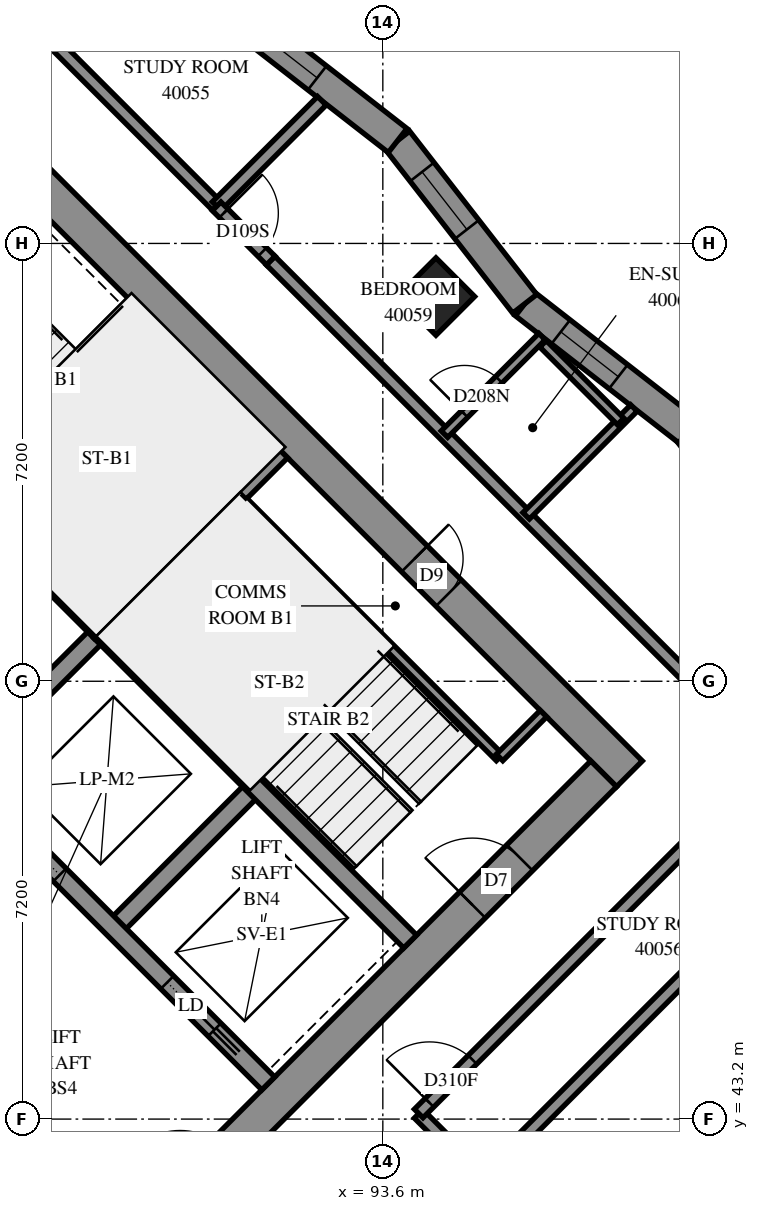
"""IFC4 building model, lengths in metres.
Left out: names, types, materials, properties, quantities, classifications, styles, units other than length and angle.
Written with IfcOpenShell. Run it as: python <this file> out.ifc"""

import sys

from ifc_helpers import new_model, si_unit, direction, frame, frame_2d, origin, origin_2d, place, context, subcontext, project, spatial, polyline, rectangle, outline, extrude, element, fill, save


model = new_model("IFC4")
c1 = context("Model", 3, precision=1e-05, world=origin(), true_north=direction((0.0, 1.0)))
c2 = subcontext(c1, "Body", "Model", "MODEL_VIEW")
j1 = project(units=[si_unit("LENGTHUNIT", "METRE"), si_unit("PLANEANGLEUNIT", "RADIAN")], contexts=[c1])
p1 = place(None, origin())
s1 = spatial("IfcSite", under=j1, at=p1, CompositionType="ELEMENT")
p2 = place(p1, origin())
s2 = spatial("IfcBuilding", under=s1, at=p2, CompositionType="ELEMENT")
p3 = place(p2, frame((0.0, 0.0, 149.0)))
s3 = spatial("IfcBuildingStorey", under=s2, at=p3, CompositionType="ELEMENT", Elevation=149.0)
p4 = place(p3, frame((94.474, 56.727, 0.0), z_axis=(0.0, 0.0, 1.0), x_axis=(0.7071067812, -0.7071067812, 0.0)))
e1 = element("IfcColumn", 1, at=p4, inside=s3, PredefinedType="COLUMN", context=c2, shape_type="SweptSolid", body=[
    extrude(rectangle(XDim=0.9, YDim=0.9, at=origin_2d()), origin(), (0.0, 0.0, 1.0), 3.1),
])
p5 = place(p3, frame((86.625, 59.908, -0.3), z_axis=(0.0, 0.0, 1.0), x_axis=(0.7071067812, -0.7071067812, 0.0)))
e2 = element("IfcWall", 2, at=p5, inside=s3, PredefinedType="SHEAR", context=c2, shape_type="SweptSolid", body=[
    extrude(rectangle(XDim=15.6, YDim=0.6, at=frame_2d((7.8, 0.0))), origin(), (0.0, 0.0, 1.0), 2.7),
])
p6 = place(p5, frame((10.6, 0.0, 0.3)))
e3 = element("IfcOpeningElement", 3, at=p6, cuts=e2, PredefinedType="OPENING", context=c2, shape_type="SweptSolid", body=[
    extrude(rectangle(XDim=0.8, YDim=2.1, at=frame_2d((0.4, 1.05))), frame((0.0, 0.31, 0.0), z_axis=(0.0, -1.0, 0.0), x_axis=(1.0, 0.0, 0.0)), (0.0, 0.0, 1.0), 0.62),
])
p7 = place(p3, frame((87.049, 38.695, -0.3), z_axis=(0.0, 0.0, 1.0), x_axis=(0.7071067812, 0.7071067812, 0.0)))
e4 = element("IfcWall", 4, at=p7, inside=s3, PredefinedType="SHEAR", context=c2, shape_type="SweptSolid", body=[
    extrude(rectangle(XDim=14.4, YDim=0.6, at=frame_2d((7.2, 0.0))), origin(), (0.0, 0.0, 1.0), 2.7),
])
p8 = place(p7, frame((4.55, 0.0, 0.3)))
e5 = element("IfcOpeningElement", 5, at=p8, cuts=e4, PredefinedType="OPENING", context=c2, shape_type="SweptSolid", body=[
    extrude(rectangle(XDim=1.1, YDim=2.1, at=frame_2d((0.55, 1.05))), frame((0.0, 0.31, 0.0), z_axis=(0.0, -1.0, 0.0), x_axis=(1.0, 0.0, 0.0)), (0.0, 0.0, 1.0), 0.62),
])
p9 = place(p7, frame((11.35, 0.0, 0.3)))
e6 = element("IfcOpeningElement", 6, at=p9, cuts=e4, PredefinedType="OPENING", context=c2, shape_type="SweptSolid", body=[
    extrude(rectangle(XDim=1.1, YDim=2.1, at=frame_2d((0.55, 1.05))), frame((0.0, 0.31, 0.0), z_axis=(0.0, -1.0, 0.0), x_axis=(1.0, 0.0, 0.0)), (0.0, 0.0, 1.0), 0.62),
])
for number, where, z_axis, x_axis in (
    (7, (86.625, 48.878, 0.0), (0.0, 0.0, 1.0), (0.707, 0.707, 0.0)),
    (8, (89.17, 46.332, 0.0), (0.0, 0.0, 1.0), (0.707, 0.707, 0.0)),
):
    element("IfcWall", number, at=place(p3, frame(where, z_axis=z_axis, x_axis=x_axis)), inside=s3, PredefinedType="SOLIDWALL", context=c2, shape_type="SweptSolid", body=[
        extrude(rectangle(XDim=3.3, YDim=0.3, at=frame_2d((1.65, 0.0))), origin(), (0.0, 0.0, 1.0), 3.1),
    ])
p10 = place(p3, frame((78.988, 51.423, 0.0), z_axis=(0.0, 0.0, 1.0), x_axis=(0.7071067812, -0.7071067812, 0.0)))
e9 = element("IfcWall", 9, at=p10, inside=s3, PredefinedType="SOLIDWALL", context=c2, shape_type="SweptSolid", body=[
    extrude(rectangle(XDim=14.4, YDim=0.3, at=frame_2d((7.2, 0.0))), origin(), (0.0, 0.0, 1.0), 3.1),
])
p11 = place(p10, frame((1.35, 0.0, 0.0)))
e10 = element("IfcOpeningElement", 10, at=p11, cuts=e9, PredefinedType="OPENING", context=c2, shape_type="SweptSolid", body=[
    extrude(rectangle(XDim=0.9, YDim=2.1, at=frame_2d((0.45, 1.05))), frame((0.0, 0.16, 0.0), z_axis=(0.0, -1.0, 0.0), x_axis=(1.0, 0.0, 0.0)), (0.0, 0.0, 1.0), 0.32),
])
p12 = place(p10, frame((4.95, 0.0, 0.0)))
e11 = element("IfcOpeningElement", 11, at=p12, cuts=e9, PredefinedType="OPENING", context=c2, shape_type="SweptSolid", body=[
    extrude(rectangle(XDim=0.9, YDim=2.1, at=frame_2d((0.45, 1.05))), frame((0.0, 0.16, 0.0), z_axis=(0.0, -1.0, 0.0), x_axis=(1.0, 0.0, 0.0)), (0.0, 0.0, 1.0), 0.32),
])
p13 = place(p10, frame((8.55, 0.0, 0.0)))
e12 = element("IfcOpeningElement", 12, at=p13, cuts=e9, PredefinedType="OPENING", context=c2, shape_type="SweptSolid", body=[
    extrude(rectangle(XDim=0.9, YDim=2.1, at=frame_2d((0.45, 1.05))), frame((0.0, 0.16, 0.0), z_axis=(0.0, -1.0, 0.0), x_axis=(1.0, 0.0, 0.0)), (0.0, 0.0, 1.0), 0.32),
])
p14 = place(p10, frame((12.05, 0.0, 0.0)))
e13 = element("IfcOpeningElement", 13, at=p14, cuts=e9, PredefinedType="OPENING", context=c2, shape_type="SweptSolid", body=[
    extrude(rectangle(XDim=1.1, YDim=2.1, at=frame_2d((0.55, 1.05))), frame((0.0, 0.16, 0.0), z_axis=(0.0, -1.0, 0.0), x_axis=(1.0, 0.0, 0.0)), (0.0, 0.0, 1.0), 0.32),
])
p15 = place(p3, frame((81.534, 53.969, 0.0), z_axis=(0.0, 0.0, 1.0), x_axis=(0.707103309, -0.7071102534, 0.0)))
e14 = element("IfcWall", 14, at=p15, inside=s3, PredefinedType="SOLIDWALL", context=c2, shape_type="SweptSolid", body=[
    extrude(rectangle(XDim=14.4, YDim=0.3, at=frame_2d((7.2, 0.0))), origin(), (0.0, 0.0, 1.0), 3.1),
])
p16 = place(p15, frame((1.25, 0.0, 0.0)))
e15 = element("IfcOpeningElement", 15, at=p16, cuts=e14, PredefinedType="OPENING", context=c2, shape_type="SweptSolid", body=[
    extrude(rectangle(XDim=1.1, YDim=2.1, at=frame_2d((0.55, 1.05))), frame((0.0, 0.16, 0.0), z_axis=(0.0, -1.0, 0.0), x_axis=(1.0, 0.0, 0.0)), (0.0, 0.0, 1.0), 0.32),
])
p17 = place(p15, frame((4.85, 0.0, 0.0)))
e16 = element("IfcOpeningElement", 16, at=p17, cuts=e14, PredefinedType="OPENING", context=c2, shape_type="SweptSolid", body=[
    extrude(rectangle(XDim=1.1, YDim=2.1, at=frame_2d((0.55, 1.05))), frame((0.0, 0.16, 0.0), z_axis=(0.0, -1.0, 0.0), x_axis=(1.0, 0.0, 0.0)), (0.0, 0.0, 1.0), 0.32),
])
p18 = place(p15, frame((8.45, 0.0, 0.0)))
e17 = element("IfcOpeningElement", 17, at=p18, cuts=e14, PredefinedType="OPENING", context=c2, shape_type="SweptSolid", body=[
    extrude(rectangle(XDim=1.1, YDim=2.1, at=frame_2d((0.55, 1.05))), frame((0.0, 0.16, 0.0), z_axis=(0.0, -1.0, 0.0), x_axis=(1.0, 0.0, 0.0)), (0.0, 0.0, 1.0), 0.32),
])
p19 = place(p15, frame((12.05, 0.0, 0.0)))
e18 = element("IfcOpeningElement", 18, at=p19, cuts=e14, PredefinedType="OPENING", context=c2, shape_type="SweptSolid", body=[
    extrude(rectangle(XDim=1.1, YDim=2.1, at=frame_2d((0.55, 1.05))), frame((0.0, 0.16, 0.0), z_axis=(0.0, -1.0, 0.0), x_axis=(1.0, 0.0, 0.0)), (0.0, 0.0, 1.0), 0.32),
])
for number, where, z_axis, x_axis in (
    (19, (83.867, 56.302, 0.0), (0.0, 0.0, 1.0), (0.707, -0.707, 0.0)),
    (20, (88.958, 51.211, 0.0), (0.0, 0.0, 1.0), (0.707, -0.707, 0.0)),
):
    element("IfcWall", number, at=place(p3, frame(where, z_axis=z_axis, x_axis=x_axis)), inside=s3, PredefinedType="SOLIDWALL", context=c2, shape_type="SweptSolid", body=[
        extrude(rectangle(XDim=7.2, YDim=0.3, at=frame_2d((3.6, 0.0))), origin(), (0.0, 0.0, 1.0), 3.1),
    ])
p20 = place(p3, frame((88.958, 51.211, 0.0), z_axis=(0.0, 0.0, 1.0), x_axis=(0.7071067812, 0.7071067812, 0.0)))
e21 = element("IfcWall", 21, at=p20, inside=s3, PredefinedType="SOLIDWALL", context=c2, shape_type="SweptSolid", body=[
    extrude(rectangle(XDim=4.2, YDim=0.3, at=frame_2d((2.1, 0.0))), origin(), (0.0, 0.0, 1.0), 3.1),
])
p21 = place(p3, frame((100.709, 51.832, 0.0), z_axis=(0.0, 0.0, 1.0), x_axis=(-0.6141887905, 0.7891591282, 0.0)))
e22 = element("IfcWall", 22, at=p21, inside=s3, PredefinedType="SOLIDWALL", context=c2, shape_type="SweptSolid", body=[
    extrude(outline(polyline([(0.031, -0.25), (3.434, -0.25), (3.372, 0.25), (-0.031, 0.25), (0.031, -0.25)])), origin(), (0.0, 0.0, 1.0), 3.1),
])
p22 = place(p21, frame((1.323, 0.0, 0.45)))
e23 = element("IfcOpeningElement", 23, at=p22, cuts=e22, PredefinedType="OPENING", context=c2, shape_type="SweptSolid", body=[
    extrude(rectangle(XDim=1.2, YDim=2.5, at=frame_2d((0.6, 1.25))), frame((0.0, 0.26, 0.0), z_axis=(0.0, -1.0, 0.0), x_axis=(1.0, 0.0, 0.0)), (0.0, 0.0, 1.0), 0.52),
])
p23 = place(p3, frame((98.619, 54.517, 0.0), z_axis=(0.0, 0.0, 1.0), x_axis=(-0.7891480422, 0.6142030344, 0.0)))
e24 = element("IfcWall", 24, at=p23, inside=s3, PredefinedType="SOLIDWALL", context=c2, shape_type="SweptSolid", body=[
    extrude(outline(polyline([(-0.031, -0.25), (3.372, -0.25), (3.434, 0.25), (0.031, 0.25), (-0.031, -0.25)])), origin(), (0.0, 0.0, 1.0), 3.1),
])
p24 = place(p23, frame((1.452, 0.0, 0.45)))
e25 = element("IfcOpeningElement", 25, at=p24, cuts=e24, PredefinedType="OPENING", context=c2, shape_type="SweptSolid", body=[
    extrude(rectangle(XDim=1.2, YDim=2.5, at=frame_2d((0.6, 1.25))), frame((0.0, 0.26, 0.0), z_axis=(0.0, -1.0, 0.0), x_axis=(1.0, 0.0, 0.0)), (0.0, 0.0, 1.0), 0.52),
])
p25 = place(p3, frame((95.934, 56.607, 0.0), z_axis=(0.0, 0.0, 1.0), x_axis=(-0.6142030344, 0.7891480422, 0.0)))
e26 = element("IfcWall", 26, at=p25, inside=s3, PredefinedType="SOLIDWALL", context=c2, shape_type="SweptSolid", body=[
    extrude(outline(polyline([(0.031, -0.25), (3.434, -0.25), (3.372, 0.25), (-0.031, 0.25), (0.031, -0.25)])), origin(), (0.0, 0.0, 1.0), 3.1),
])
p26 = place(p25, frame((1.548, 0.0, 0.45)))
e27 = element("IfcOpeningElement", 27, at=p26, cuts=e26, PredefinedType="OPENING", context=c2, shape_type="SweptSolid", body=[
    extrude(rectangle(XDim=1.2, YDim=2.5, at=frame_2d((0.6, 1.25))), frame((0.0, 0.26, 0.0), z_axis=(0.0, -1.0, 0.0), x_axis=(1.0, 0.0, 0.0)), (0.0, 0.0, 1.0), 0.52),
])
p27 = place(p3, frame((93.844, 59.293, 0.0), z_axis=(0.0, 0.0, 1.0), x_axis=(-0.7891591282, 0.6141887905, 0.0)))
e28 = element("IfcWall", 28, at=p27, inside=s3, PredefinedType="SOLIDWALL", context=c2, shape_type="SweptSolid", body=[
    extrude(outline(polyline([(-0.031, -0.25), (3.372, -0.25), (3.434, 0.25), (0.031, 0.25), (-0.031, -0.25)])), origin(), (0.0, 0.0, 1.0), 3.1),
])
p28 = place(p27, frame((1.677, 0.0, 0.45)))
e29 = element("IfcOpeningElement", 29, at=p28, cuts=e28, PredefinedType="OPENING", context=c2, shape_type="SweptSolid", body=[
    extrude(rectangle(XDim=1.2, YDim=2.5, at=frame_2d((0.6, 1.25))), frame((0.0, 0.26, 0.0), z_axis=(0.0, -1.0, 0.0), x_axis=(1.0, 0.0, 0.0)), (0.0, 0.0, 1.0), 0.52),
])
p29 = place(p3, frame((91.313, 53.354, 0.0), z_axis=(0.0, 0.0, 1.0), x_axis=(0.7071067812, -0.7071067812, 0.0)))
e30 = element("IfcWall", 30, at=p29, inside=s3, PredefinedType="PARTITIONING", context=c2, shape_type="SweptSolid", body=[
    extrude(rectangle(XDim=5.95, YDim=0.15, at=frame_2d((2.975, 0.0))), origin(), (0.0, 0.0, 1.0), 3.1),
])
p30 = place(p3, frame((95.52, 49.146, 0.0), z_axis=(0.0, 0.0, 1.0), x_axis=(0.7071067812, 0.7071067812, 0.0)))
e31 = element("IfcWall", 31, at=p30, inside=s3, PredefinedType="PARTITIONING", context=c2, shape_type="SweptSolid", body=[
    extrude(rectangle(XDim=1.02, YDim=0.15, at=frame_2d((0.51, 0.0))), origin(), (0.0, 0.0, 1.0), 3.1),
])
p31 = place(p3, frame((94.189, 43.287, 0.0), z_axis=(0.0, 0.0, 1.0), x_axis=(0.7071067812, -0.7071067812, 0.0)))
e32 = element("IfcWall", 32, at=p31, inside=s3, PredefinedType="PARTITIONING", context=c2, shape_type="SweptSolid", body=[
    extrude(rectangle(XDim=12.298, YDim=0.2, at=frame_2d((6.149, 0.0))), origin(), (0.0, 0.0, 1.0), 3.1),
])
p32 = place(p31, frame((3.755, 0.0, 0.0)))
e33 = element("IfcOpeningElement", 33, at=p32, cuts=e32, PredefinedType="OPENING", context=c2, shape_type="SweptSolid", body=[
    extrude(rectangle(XDim=0.9, YDim=2.1, at=frame_2d((0.45, 1.05))), frame((0.0, 0.11, 0.0), z_axis=(0.0, -1.0, 0.0), x_axis=(1.0, 0.0, 0.0)), (0.0, 0.0, 1.0), 0.22),
])
p33 = place(p31, frame((10.998, 0.0, 0.0)))
e34 = element("IfcOpeningElement", 34, at=p33, cuts=e32, PredefinedType="OPENING", context=c2, shape_type="SweptSolid", body=[
    extrude(rectangle(XDim=0.9, YDim=2.1, at=frame_2d((0.45, 1.05))), frame((0.0, 0.11, 0.0), z_axis=(0.0, -1.0, 0.0), x_axis=(1.0, 0.0, 0.0)), (0.0, 0.0, 1.0), 0.22),
])
p34 = place(p3, frame((91.755, 57.317, 0.0), z_axis=(0.0, 0.0, 1.0), x_axis=(0.7071067812, -0.7071067812, 0.0)))
e35 = element("IfcWall", 35, at=p34, inside=s3, PredefinedType="PARTITIONING", context=c2, shape_type="SweptSolid", body=[
    extrude(rectangle(XDim=11.639, YDim=0.2, at=frame_2d((5.819, 0.0))), origin(), (0.0, 0.0, 1.0), 3.1),
])
p35 = place(p3, frame((95.25, 42.232, 0.0), z_axis=(0.0, 0.0, 1.0), x_axis=(0.7071114274, 0.7071021349, 0.0)))
e36 = element("IfcWall", 36, at=p35, inside=s3, PredefinedType="PARTITIONING", context=c2, shape_type="SweptSolid", body=[
    extrude(rectangle(XDim=10.761, YDim=0.2, at=frame_2d((5.381, 0.0))), origin(), (0.0, 0.0, 1.0), 3.1),
])
p36 = place(p3, frame((94.19, 43.292, 0.0), z_axis=(0.0, 0.0, 1.0), x_axis=(0.7071067812, 0.7071067812, 0.0)))
e37 = element("IfcWall", 37, at=p36, inside=s3, PredefinedType="PARTITIONING", context=c2, shape_type="SweptSolid", body=[
    extrude(rectangle(XDim=8.2, YDim=0.2, at=frame_2d((4.1, 0.0))), origin(), (0.0, 0.0, 1.0), 3.1),
])
p37 = place(p36, frame((0.251, 0.0, 0.0)))
e38 = element("IfcOpeningElement", 38, at=p37, cuts=e37, PredefinedType="OPENING", context=c2, shape_type="SweptSolid", body=[
    extrude(rectangle(XDim=1.0, YDim=2.1, at=frame_2d((0.5, 1.05))), frame((0.0, 0.11, 0.0), z_axis=(0.0, -1.0, 0.0), x_axis=(1.0, 0.0, 0.0)), (0.0, 0.0, 1.0), 0.22),
])
p38 = place(p3, frame((86.841, 62.245, 0.0), z_axis=(0.0, 0.0, 1.0), x_axis=(0.7071067812, -0.7071067812, 0.0)))
e39 = element("IfcWall", 39, at=p38, inside=s3, PredefinedType="PARTITIONING", context=c2, shape_type="SweptSolid", body=[
    extrude(rectangle(XDim=5.699, YDim=0.2, at=frame_2d((2.85, 0.0))), origin(), (0.0, 0.0, 1.0), 3.1),
])
p39 = place(p3, frame((95.957, 53.121, 0.0), z_axis=(0.0, 0.0, 1.0), x_axis=(0.7071067812, 0.7071067812, 0.0)))
e40 = element("IfcWall", 40, at=p39, inside=s3, PredefinedType="PARTITIONING", context=c2, shape_type="SweptSolid", body=[
    extrude(rectangle(XDim=2.506, YDim=0.15, at=frame_2d((1.253, 0.0))), origin(), (0.0, 0.0, 1.0), 3.1),
])
p40 = place(p3, frame((90.867, 58.213, 0.0), z_axis=(0.0, 0.0, 1.0), x_axis=(0.7066165577, 0.707596665, 0.0)))
e41 = element("IfcWall", 41, at=p40, inside=s3, PredefinedType="PARTITIONING", context=c2, shape_type="SweptSolid", body=[
    extrude(rectangle(XDim=2.449, YDim=0.2, at=frame_2d((1.224, 0.0))), origin(), (0.0, 0.0, 1.0), 3.1),
])
p41 = place(p3, frame((94.614, 54.464, 0.0), z_axis=(0.0, 0.0, 1.0), x_axis=(0.7070847464, 0.7071288153, 0.0)))
e42 = element("IfcWall", 42, at=p41, inside=s3, PredefinedType="PARTITIONING", context=c2, shape_type="SweptSolid", body=[
    extrude(rectangle(XDim=2.269, YDim=0.15, at=frame_2d((1.135, 0.0))), origin(), (0.0, 0.0, 1.0), 3.1),
])
p42 = place(p41, frame((0.466, 0.0, 0.0)))
e43 = element("IfcOpeningElement", 43, at=p42, cuts=e42, PredefinedType="OPENING", context=c2, shape_type="SweptSolid", body=[
    extrude(rectangle(XDim=0.8, YDim=2.1, at=frame_2d((0.4, 1.05))), frame((0.0, 0.085, 0.0), z_axis=(0.0, -1.0, 0.0), x_axis=(1.0, 0.0, 0.0)), (0.0, 0.0, 1.0), 0.17),
])
p43 = place(p3, frame((96.235, 55.949, 0.0), z_axis=(0.0, 0.0, 1.0), x_axis=(0.7071067812, -0.7071067812, 0.0)))
e44 = element("IfcWall", 44, at=p43, inside=s3, PredefinedType="PARTITIONING", context=c2, shape_type="SweptSolid", body=[
    extrude(rectangle(XDim=1.804, YDim=0.15, at=frame_2d((0.902, 0.0))), origin(), (0.0, 0.0, 1.0), 3.1),
])
p44 = place(p3, frame((90.867, 58.211, 0.0), z_axis=(0.0, 0.0, 1.0), x_axis=(0.706312726, -0.7078999456, 0.0)))
e45 = element("IfcWall", 45, at=p44, inside=s3, PredefinedType="PARTITIONING", context=c2, shape_type="SweptSolid", body=[
    extrude(rectangle(XDim=1.26, YDim=0.2, at=frame_2d((0.63, 0.0))), origin(), (0.0, 0.0, 1.0), 3.1),
])
p45 = place(p44, frame((0.162, 0.0, 0.0)))
e46 = element("IfcOpeningElement", 46, at=p45, cuts=e45, PredefinedType="OPENING", context=c2, shape_type="SweptSolid", body=[
    extrude(rectangle(XDim=0.9, YDim=2.1, at=frame_2d((0.45, 1.05))), frame((0.0, 0.11, 0.0), z_axis=(0.0, -1.0, 0.0), x_axis=(1.0, 0.0, 0.0)), (0.0, 0.0, 1.0), 0.22),
])
p46 = place(p24, origin())
e47 = element("IfcWindow", 47, at=p46, inside=s3, PartitioningType="SINGLE_PANEL", PredefinedType="WINDOW", context=c2, shape_type="SweptSolid", body=[
    extrude(rectangle(XDim=1.2, YDim=2.5, at=frame_2d((0.6, 1.25))), frame((0.0, 0.18, 0.0), z_axis=(0.0, -1.0, 0.0), x_axis=(1.0, 0.0, 0.0)), (0.0, 0.0, 1.0), 0.06),
])
fill(e25, e47)
p47 = place(p26, origin())
e48 = element("IfcWindow", 48, at=p47, inside=s3, PartitioningType="SINGLE_PANEL", PredefinedType="WINDOW", context=c2, shape_type="SweptSolid", body=[
    extrude(rectangle(XDim=1.2, YDim=2.5, at=frame_2d((0.6, 1.25))), frame((0.0, 0.18, 0.0), z_axis=(0.0, -1.0, 0.0), x_axis=(1.0, 0.0, 0.0)), (0.0, 0.0, 1.0), 0.06),
])
fill(e27, e48)
p48 = place(p28, origin())
e49 = element("IfcWindow", 49, at=p48, inside=s3, PartitioningType="SINGLE_PANEL", PredefinedType="WINDOW", context=c2, shape_type="SweptSolid", body=[
    extrude(rectangle(XDim=1.2, YDim=2.5, at=frame_2d((0.6, 1.25))), frame((0.0, 0.18, 0.0), z_axis=(0.0, -1.0, 0.0), x_axis=(1.0, 0.0, 0.0)), (0.0, 0.0, 1.0), 0.06),
])
fill(e29, e49)
p49 = place(p6, origin())
e50 = element("IfcDoor", 50, at=p49, inside=s3, OperationType="SINGLE_SWING_RIGHT", PredefinedType="DOOR", context=c2, shape_type="SweptSolid", body=[
    extrude(rectangle(XDim=0.8, YDim=2.1, at=frame_2d((0.4, 1.05))), frame((0.0, 0.025, 0.0), z_axis=(0.0, -1.0, 0.0), x_axis=(1.0, 0.0, 0.0)), (0.0, 0.0, 1.0), 0.05),
])
fill(e3, e50)
p50 = place(p9, origin())
e51 = element("IfcDoor", 51, at=p50, inside=s3, OperationType="SINGLE_SWING_RIGHT", PredefinedType="DOOR", context=c2, shape_type="SweptSolid", body=[
    extrude(rectangle(XDim=1.1, YDim=2.1, at=frame_2d((0.55, 1.05))), frame((0.0, 0.025, 0.0), z_axis=(0.0, -1.0, 0.0), x_axis=(1.0, 0.0, 0.0)), (0.0, 0.0, 1.0), 0.05),
])
fill(e6, e51)
p51 = place(p18, origin())
e52 = element("IfcDoor", 52, at=p51, inside=s3, OperationType="SLIDING_TO_LEFT", PredefinedType="DOOR", context=c2, shape_type="SweptSolid", body=[
    extrude(rectangle(XDim=1.1, YDim=2.1, at=frame_2d((0.55, 1.05))), frame((0.0, 0.025, 0.0), z_axis=(0.0, -1.0, 0.0), x_axis=(1.0, 0.0, 0.0)), (0.0, 0.0, 1.0), 0.05),
])
fill(e17, e52)
p52 = place(p19, origin())
e53 = element("IfcDoor", 53, at=p52, inside=s3, OperationType="SLIDING_TO_RIGHT", PredefinedType="DOOR", context=c2, shape_type="SweptSolid", body=[
    extrude(rectangle(XDim=1.1, YDim=2.1, at=frame_2d((0.55, 1.05))), frame((0.0, 0.025, 0.0), z_axis=(0.0, -1.0, 0.0), x_axis=(1.0, 0.0, 0.0)), (0.0, 0.0, 1.0), 0.05),
])
fill(e18, e53)
p53 = place(p37, origin())
e54 = element("IfcDoor", 54, at=p53, inside=s3, OperationType="SINGLE_SWING_RIGHT", PredefinedType="DOOR", context=c2, shape_type="SweptSolid", body=[
    extrude(rectangle(XDim=1.0, YDim=2.1, at=frame_2d((0.5, 1.05))), frame((0.0, 0.025, 0.0), z_axis=(0.0, -1.0, 0.0), x_axis=(1.0, 0.0, 0.0)), (0.0, 0.0, 1.0), 0.05),
])
fill(e38, e54)
p54 = place(p45, origin())
e55 = element("IfcDoor", 55, at=p54, inside=s3, OperationType="SINGLE_SWING_RIGHT", PredefinedType="DOOR", context=c2, shape_type="SweptSolid", body=[
    extrude(rectangle(XDim=0.9, YDim=2.1, at=frame_2d((0.45, 1.05))), frame((0.0, 0.025, 0.0), z_axis=(0.0, -1.0, 0.0), x_axis=(1.0, 0.0, 0.0)), (0.0, 0.0, 1.0), 0.05),
])
fill(e46, e55)
p55 = place(p42, origin())
e56 = element("IfcDoor", 56, at=p55, inside=s3, OperationType="SINGLE_SWING_RIGHT", PredefinedType="DOOR", context=c2, shape_type="SweptSolid", body=[
    extrude(rectangle(XDim=0.8, YDim=2.1, at=frame_2d((0.4, 1.05))), frame((0.0, 0.025, 0.0), z_axis=(0.0, -1.0, 0.0), x_axis=(1.0, 0.0, 0.0)), (0.0, 0.0, 1.0), 0.05),
])
fill(e43, e56)
save(model, sys.argv[1])
